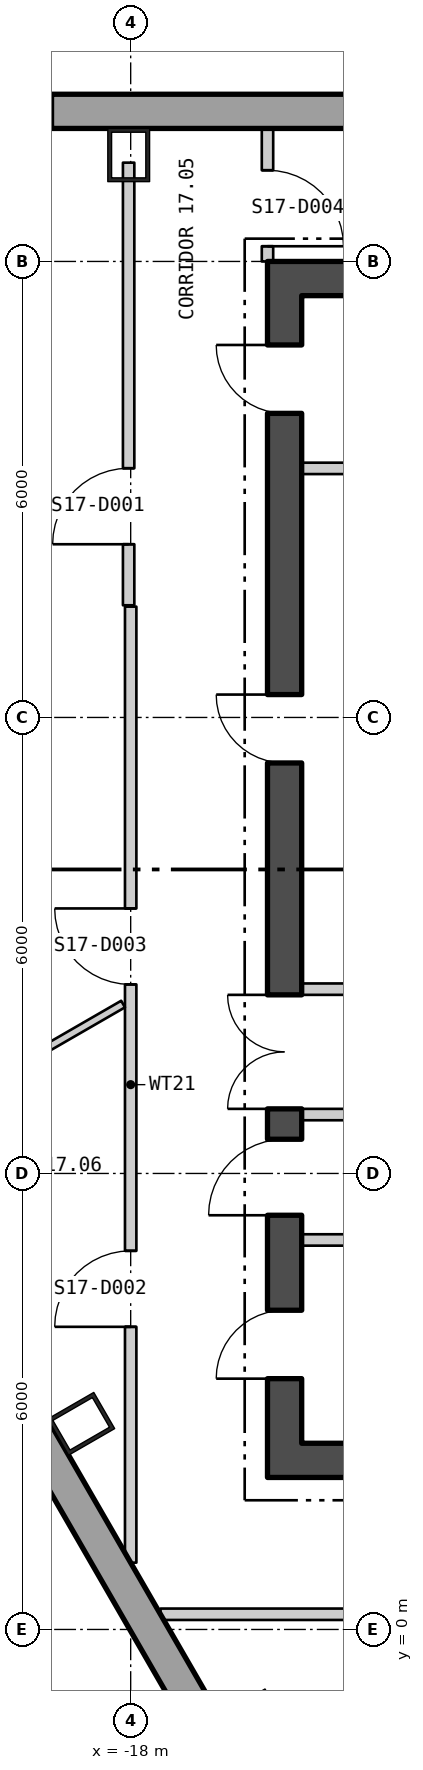
"""IFC4 building model, lengths in metres.
Left out: names, types, materials, properties, quantities, classifications, styles, units other than length and angle.
Written with IfcOpenShell. Run it as: python <this file> out.ifc"""

import sys

from ifc_helpers import new_model, si_unit, direction, frame, frame_2d, origin, origin_2d, place, context, subcontext, project, spatial, polyline, rectangle, hollow_rectangle, outline, extrude, element, fill, save


model = new_model("IFC4")
c1 = context("Model", 3, precision=1e-05, world=origin(), true_north=direction((0.0, 1.0)))
c2 = subcontext(c1, "Body", "Model", "MODEL_VIEW")
j1 = project(units=[si_unit("LENGTHUNIT", "METRE"), si_unit("PLANEANGLEUNIT", "RADIAN")], contexts=[c1])
p1 = place(None, origin())
s1 = spatial("IfcSite", under=j1, at=p1, CompositionType="ELEMENT")
p2 = place(p1, origin())
s2 = spatial("IfcBuilding", under=s1, at=p2, CompositionType="ELEMENT")
p3 = place(p2, frame((0.0, 0.0, 227.7)))
s3 = spatial("IfcBuildingStorey", under=s2, at=p3, CompositionType="ELEMENT", Elevation=227.7)
for number, where, z_axis, x_axis in (
    (1, (-18.026, 19.4, 0.0), (0.0, 0.0, 1.0), (-1.0, 0.0, 0.0)),
    (2, (-18.651, 2.706, 0.0), (0.0, 0.0, 1.0), (0.5, -0.866, 0.0)),
    (3, (-16.398, -1.196, 0.0), (0.0, 0.0, 1.0), (0.5, -0.866, 0.0)),
):
    element("IfcColumn", number, at=place(p3, frame(where, z_axis=z_axis, x_axis=x_axis)), inside=s3, PredefinedType="COLUMN", context=c2, shape_type="SweptSolid", body=[
        extrude(hollow_rectangle(XDim=0.55, YDim=0.7, WallThickness=0.05, at=origin_2d()), origin(), (0.0, 0.0, 1.0), 3.9),
    ])
p4 = place(p3, frame((22.865, 19.975, -0.4), z_axis=(0.0, 0.0, 1.0), x_axis=(-1.0, 0.0, 0.0)))
e4 = element("IfcWall", 4, at=p4, inside=s3, PredefinedType="SOLIDWALL", context=c2, shape_type="SweptSolid", body=[
    extrude(outline(polyline([(-0.13, -0.225), (45.86, -0.225), (45.6, 0.225), (0.13, 0.225), (-0.13, -0.225)])), origin(), (0.0, 0.0, 1.0), 3.9),
])
p5 = place(p4, frame((1.424, 0.0, 1.3)))
e5 = element("IfcOpeningElement", 5, at=p5, cuts=e4, PredefinedType="OPENING", context=c2, shape_type="SweptSolid", body=[
    extrude(rectangle(XDim=2.4, YDim=2.0, at=frame_2d((1.2, 1.0))), frame((0.0, 0.235, 0.0), z_axis=(0.0, -1.0, 0.0), x_axis=(1.0, 0.0, 0.0)), (0.0, 0.0, 1.0), 0.47),
])
p6 = place(p4, frame((10.399, 0.0, 1.3)))
e6 = element("IfcOpeningElement", 6, at=p6, cuts=e4, PredefinedType="OPENING", context=c2, shape_type="SweptSolid", body=[
    extrude(rectangle(XDim=2.4, YDim=2.0, at=frame_2d((1.2, 1.0))), frame((0.0, 0.235, 0.0), z_axis=(0.0, -1.0, 0.0), x_axis=(1.0, 0.0, 0.0)), (0.0, 0.0, 1.0), 0.47),
])
p7 = place(p4, frame((14.905, 0.0, 1.3)))
e7 = element("IfcOpeningElement", 7, at=p7, cuts=e4, PredefinedType="OPENING", context=c2, shape_type="SweptSolid", body=[
    extrude(rectangle(XDim=2.4, YDim=2.0, at=frame_2d((1.2, 1.0))), frame((0.0, 0.235, 0.0), z_axis=(0.0, -1.0, 0.0), x_axis=(1.0, 0.0, 0.0)), (0.0, 0.0, 1.0), 0.47),
])
p8 = place(p4, frame((19.412, 0.0, 1.3)))
e8 = element("IfcOpeningElement", 8, at=p8, cuts=e4, PredefinedType="OPENING", context=c2, shape_type="SweptSolid", body=[
    extrude(rectangle(XDim=2.4, YDim=2.0, at=frame_2d((1.2, 1.0))), frame((0.0, 0.235, 0.0), z_axis=(0.0, -1.0, 0.0), x_axis=(1.0, 0.0, 0.0)), (0.0, 0.0, 1.0), 0.47),
])
p9 = place(p4, frame((23.918, 0.0, 1.3)))
e9 = element("IfcOpeningElement", 9, at=p9, cuts=e4, PredefinedType="OPENING", context=c2, shape_type="SweptSolid", body=[
    extrude(rectangle(XDim=2.4, YDim=2.0, at=frame_2d((1.2, 1.0))), frame((0.0, 0.235, 0.0), z_axis=(0.0, -1.0, 0.0), x_axis=(1.0, 0.0, 0.0)), (0.0, 0.0, 1.0), 0.47),
])
p10 = place(p4, frame((28.425, 0.0, 1.3)))
e10 = element("IfcOpeningElement", 10, at=p10, cuts=e4, PredefinedType="OPENING", context=c2, shape_type="SweptSolid", body=[
    extrude(rectangle(XDim=2.4, YDim=2.0, at=frame_2d((1.2, 1.0))), frame((0.0, 0.235, 0.0), z_axis=(0.0, -1.0, 0.0), x_axis=(1.0, 0.0, 0.0)), (0.0, 0.0, 1.0), 0.47),
])
p11 = place(p4, frame((32.932, 0.0, 1.3)))
e11 = element("IfcOpeningElement", 11, at=p11, cuts=e4, PredefinedType="OPENING", context=c2, shape_type="SweptSolid", body=[
    extrude(rectangle(XDim=2.4, YDim=2.0, at=frame_2d((1.2, 1.0))), frame((0.0, 0.235, 0.0), z_axis=(0.0, -1.0, 0.0), x_axis=(1.0, 0.0, 0.0)), (0.0, 0.0, 1.0), 0.47),
])
p12 = place(p4, frame((41.907, 0.0, 1.3)))
e12 = element("IfcOpeningElement", 12, at=p12, cuts=e4, PredefinedType="OPENING", context=c2, shape_type="SweptSolid", body=[
    extrude(rectangle(XDim=2.4, YDim=2.0, at=frame_2d((1.2, 1.0))), frame((0.0, 0.235, 0.0), z_axis=(0.0, -1.0, 0.0), x_axis=(1.0, 0.0, 0.0)), (0.0, 0.0, 1.0), 0.47),
])
p13 = place(p3, frame((-26.075, 14.415, -0.18), z_axis=(0.0, 0.0, 1.0), x_axis=(0.499999194392, -0.866025868902, 0.0)))
e13 = element("IfcWall", 13, at=p13, inside=s3, PredefinedType="SOLIDWALL", context=c2, shape_type="SweptSolid", body=[
    extrude(outline(polyline([(-0.13, -0.225), (45.86, -0.225), (45.6, 0.225), (0.13, 0.225), (-0.13, -0.225)])), origin(), (0.0, 0.0, 1.0), 3.68),
])
p14 = place(p13, frame((1.424, 0.0, 1.08)))
e14 = element("IfcOpeningElement", 14, at=p14, cuts=e13, PredefinedType="OPENING", context=c2, shape_type="SweptSolid", body=[
    extrude(rectangle(XDim=2.4, YDim=2.0, at=frame_2d((1.2, 1.0))), frame((0.0, 0.235, 0.0), z_axis=(0.0, -1.0, 0.0), x_axis=(1.0, 0.0, 0.0)), (0.0, 0.0, 1.0), 0.47),
])
p15 = place(p13, frame((5.892, 0.0, 1.08)))
e15 = element("IfcOpeningElement", 15, at=p15, cuts=e13, PredefinedType="OPENING", context=c2, shape_type="SweptSolid", body=[
    extrude(rectangle(XDim=2.4, YDim=2.0, at=frame_2d((1.2, 1.0))), frame((0.0, 0.235, 0.0), z_axis=(0.0, -1.0, 0.0), x_axis=(1.0, 0.0, 0.0)), (0.0, 0.0, 1.0), 0.47),
])
p16 = place(p13, frame((10.399, 0.0, 1.08)))
e16 = element("IfcOpeningElement", 16, at=p16, cuts=e13, PredefinedType="OPENING", context=c2, shape_type="SweptSolid", body=[
    extrude(rectangle(XDim=2.4, YDim=2.0, at=frame_2d((1.2, 1.0))), frame((0.0, 0.235, 0.0), z_axis=(0.0, -1.0, 0.0), x_axis=(1.0, 0.0, 0.0)), (0.0, 0.0, 1.0), 0.47),
])
p17 = place(p13, frame((19.412, 0.0, 1.08)))
e17 = element("IfcOpeningElement", 17, at=p17, cuts=e13, PredefinedType="OPENING", context=c2, shape_type="SweptSolid", body=[
    extrude(rectangle(XDim=2.4, YDim=2.0, at=frame_2d((1.2, 1.0))), frame((0.0, 0.235, 0.0), z_axis=(0.0, -1.0, 0.0), x_axis=(1.0, 0.0, 0.0)), (0.0, 0.0, 1.0), 0.47),
])
p18 = place(p13, frame((23.918, 0.0, 1.08)))
e18 = element("IfcOpeningElement", 18, at=p18, cuts=e13, PredefinedType="OPENING", context=c2, shape_type="SweptSolid", body=[
    extrude(rectangle(XDim=2.4, YDim=2.0, at=frame_2d((1.2, 1.0))), frame((0.0, 0.235, 0.0), z_axis=(0.0, -1.0, 0.0), x_axis=(1.0, 0.0, 0.0)), (0.0, 0.0, 1.0), 0.47),
])
p19 = place(p13, frame((28.425, 0.0, 1.08)))
e19 = element("IfcOpeningElement", 19, at=p19, cuts=e13, PredefinedType="OPENING", context=c2, shape_type="SweptSolid", body=[
    extrude(rectangle(XDim=2.4, YDim=2.0, at=frame_2d((1.2, 1.0))), frame((0.0, 0.235, 0.0), z_axis=(0.0, -1.0, 0.0), x_axis=(1.0, 0.0, 0.0)), (0.0, 0.0, 1.0), 0.47),
])
p20 = place(p13, frame((32.932, 0.0, 1.08)))
e20 = element("IfcOpeningElement", 20, at=p20, cuts=e13, PredefinedType="OPENING", context=c2, shape_type="SweptSolid", body=[
    extrude(rectangle(XDim=2.4, YDim=2.0, at=frame_2d((1.2, 1.0))), frame((0.0, 0.235, 0.0), z_axis=(0.0, -1.0, 0.0), x_axis=(1.0, 0.0, 0.0)), (0.0, 0.0, 1.0), 0.47),
])
p21 = place(p13, frame((41.907, 0.0, 1.08)))
e21 = element("IfcOpeningElement", 21, at=p21, cuts=e13, PredefinedType="OPENING", context=c2, shape_type="SweptSolid", body=[
    extrude(rectangle(XDim=2.4, YDim=2.0, at=frame_2d((1.2, 1.0))), frame((0.0, 0.235, 0.0), z_axis=(0.0, -1.0, 0.0), x_axis=(1.0, 0.0, 0.0)), (0.0, 0.0, 1.0), 0.47),
])
p22 = place(p3, frame((-16.2, 2.225, 0.0), z_axis=(0.0, 0.0, 1.0), x_axis=(1.0, 0.0, 0.0)))
e22 = element("IfcWall", 22, at=p22, inside=s3, PredefinedType="SHEAR", context=c2, shape_type="SweptSolid", body=[
    extrude(rectangle(XDim=32.4, YDim=0.45, at=frame_2d((16.2, 0.0))), origin(), (0.0, 0.0, 1.0), 3.7),
])
p23 = place(p22, frame((10.7, 0.0, 0.0)))
e23 = element("IfcOpeningElement", 23, at=p23, cuts=e22, PredefinedType="OPENING", context=c2, shape_type="SweptSolid", body=[
    extrude(rectangle(XDim=1.8, YDim=2.4, at=frame_2d((0.9, 1.2))), frame((0.0, 0.235, 0.0), z_axis=(0.0, -1.0, 0.0), x_axis=(1.0, 0.0, 0.0)), (0.0, 0.0, 1.0), 0.47),
])
p24 = place(p22, frame((20.7, 0.0, 0.0)))
e24 = element("IfcOpeningElement", 24, at=p24, cuts=e22, PredefinedType="OPENING", context=c2, shape_type="SweptSolid", body=[
    extrude(rectangle(XDim=1.8, YDim=2.4, at=frame_2d((0.9, 1.2))), frame((0.0, 0.235, 0.0), z_axis=(0.0, -1.0, 0.0), x_axis=(1.0, 0.0, 0.0)), (0.0, 0.0, 1.0), 0.47),
])
p25 = place(p3, frame((-16.2, 17.775, 0.0), z_axis=(0.0, 0.0, 1.0), x_axis=(1.0, 0.0, 0.0)))
e25 = element("IfcWall", 25, at=p25, inside=s3, PredefinedType="SHEAR", context=c2, shape_type="SweptSolid", body=[
    extrude(rectangle(XDim=32.4, YDim=0.45, at=frame_2d((16.2, 0.0))), origin(), (0.0, 0.0, 1.0), 3.7),
])
p26 = place(p3, frame((-15.975, 2.45, 0.0), z_axis=(0.0, 0.0, 1.0), x_axis=(0.0, 1.0, 0.0)))
e26 = element("IfcWall", 26, at=p26, inside=s3, PredefinedType="SHEAR", context=c2, shape_type="SweptSolid", body=[
    extrude(rectangle(XDim=15.1, YDim=0.45, at=frame_2d((7.55, 0.0))), origin(), (0.0, 0.0, 1.0), 3.7),
])
p27 = place(p26, frame((4.4, 0.0, 0.0)))
e27 = element("IfcOpeningElement", 27, at=p27, cuts=e26, PredefinedType="OPENING", context=c2, shape_type="SweptSolid", body=[
    extrude(rectangle(XDim=1.5, YDim=2.1, at=frame_2d((0.75, 1.05))), frame((0.0, 0.235, 0.0), z_axis=(0.0, -1.0, 0.0), x_axis=(1.0, 0.0, 0.0)), (0.0, 0.0, 1.0), 0.47),
])
p28 = place(p26, frame((0.85, 0.0, 0.0)))
e28 = element("IfcOpeningElement", 28, at=p28, cuts=e26, PredefinedType="OPENING", context=c2, shape_type="SweptSolid", body=[
    extrude(rectangle(XDim=0.9, YDim=2.1, at=frame_2d((0.45, 1.05))), frame((0.0, 0.235, 0.0), z_axis=(0.0, -1.0, 0.0), x_axis=(1.0, 0.0, 0.0)), (0.0, 0.0, 1.0), 0.47),
])
p29 = place(p26, frame((3.0, 0.0, 0.0)))
e29 = element("IfcOpeningElement", 29, at=p29, cuts=e26, PredefinedType="OPENING", context=c2, shape_type="SweptSolid", body=[
    extrude(rectangle(XDim=1.0, YDim=2.1, at=frame_2d((0.5, 1.05))), frame((0.0, 0.235, 0.0), z_axis=(0.0, -1.0, 0.0), x_axis=(1.0, 0.0, 0.0)), (0.0, 0.0, 1.0), 0.47),
])
p30 = place(p26, frame((8.951, 0.0, 0.0)))
e30 = element("IfcOpeningElement", 30, at=p30, cuts=e26, PredefinedType="OPENING", context=c2, shape_type="SweptSolid", body=[
    extrude(rectangle(XDim=0.9, YDim=2.1, at=frame_2d((0.45, 1.05))), frame((0.0, 0.235, 0.0), z_axis=(0.0, -1.0, 0.0), x_axis=(1.0, 0.0, 0.0)), (0.0, 0.0, 1.0), 0.47),
])
p31 = place(p26, frame((13.551, 0.0, 0.0)))
e31 = element("IfcOpeningElement", 31, at=p31, cuts=e26, PredefinedType="OPENING", context=c2, shape_type="SweptSolid", body=[
    extrude(rectangle(XDim=0.9, YDim=2.1, at=frame_2d((0.45, 1.05))), frame((0.0, 0.235, 0.0), z_axis=(0.0, -1.0, 0.0), x_axis=(1.0, 0.0, 0.0)), (0.0, 0.0, 1.0), 0.47),
])
for number, where, z_axis, x_axis in (
    (32, (-15.75, 6.775, 0.0), (0.0, 0.0, 1.0), (1.0, 0.0, 0.0)),
    (33, (-15.75, 8.425, 0.0), (0.0, 0.0, 1.0), (1.0, 0.0, 0.0)),
    (34, (-15.75, 5.125, 0.0), (0.0, 0.0, 1.0), (1.0, 0.0, 0.0)),
    (35, (-15.75, 15.277, 0.0), (0.0, 0.0, 1.0), (1.0, 0.0, 0.0)),
):
    element("IfcWall", number, at=place(p3, frame(where, z_axis=z_axis, x_axis=x_axis)), inside=s3, PredefinedType="PARTITIONING", context=c2, shape_type="SweptSolid", body=[
        extrude(rectangle(XDim=1.25, YDim=0.15, at=frame_2d((0.625, 0.0))), origin(), (0.0, 0.0, 1.0), 3.7),
    ])
p32 = place(p3, frame((-20.818, 6.66, 0.0), z_axis=(0.0, 0.0, 1.0), x_axis=(0.866058244174, 0.499943114462, 0.0)))
e36 = element("IfcWall", 36, at=p32, inside=s3, PredefinedType="PARTITIONING", context=c2, shape_type="SweptSolid", body=[
    extrude(rectangle(XDim=3.138, YDim=0.1, at=frame_2d((1.569, 0.0))), origin(), (0.0, 0.0, 1.0), 3.7),
])
p33 = place(p3, frame((-18.027, 13.476, 0.0), z_axis=(0.0, 0.0, 1.0), x_axis=(0.0, 1.0, 0.0)))
e37 = element("IfcWall", 37, at=p33, inside=s3, PredefinedType="PARTITIONING", context=c2, shape_type="SweptSolid", body=[
    extrude(rectangle(XDim=5.824, YDim=0.15, at=frame_2d((2.912, 0.0))), origin(), (0.0, 0.0, 1.0), 3.7),
])
p34 = place(p33, frame((0.803, 0.0, 0.0)))
e38 = element("IfcOpeningElement", 38, at=p34, cuts=e37, PredefinedType="OPENING", context=c2, shape_type="SweptSolid", body=[
    extrude(rectangle(XDim=1.0, YDim=2.1, at=frame_2d((0.5, 1.05))), frame((0.0, 0.085, 0.0), z_axis=(0.0, -1.0, 0.0), x_axis=(1.0, 0.0, 0.0)), (0.0, 0.0, 1.0), 0.17),
])
p35 = place(p3, frame((-18.0, 0.879, 0.0), z_axis=(0.0, 0.0, 1.0), x_axis=(0.0, 1.0, 0.0)))
e39 = element("IfcWall", 39, at=p35, inside=s3, PredefinedType="PARTITIONING", context=c2, shape_type="SweptSolid", body=[
    extrude(rectangle(XDim=12.579, YDim=0.15, at=frame_2d((6.29, 0.0))), origin(), (0.0, 0.0, 1.0), 3.7),
])
p36 = place(p35, frame((3.103, 0.0, 0.0)))
e40 = element("IfcOpeningElement", 40, at=p36, cuts=e39, PredefinedType="OPENING", context=c2, shape_type="SweptSolid", body=[
    extrude(rectangle(XDim=1.0, YDim=2.1, at=frame_2d((0.5, 1.05))), frame((0.0, 0.085, 0.0), z_axis=(0.0, -1.0, 0.0), x_axis=(1.0, 0.0, 0.0)), (0.0, 0.0, 1.0), 0.17),
])
p37 = place(p35, frame((7.608, 0.0, 0.0)))
e41 = element("IfcOpeningElement", 41, at=p37, cuts=e39, PredefinedType="OPENING", context=c2, shape_type="SweptSolid", body=[
    extrude(rectangle(XDim=1.0, YDim=2.1, at=frame_2d((0.5, 1.05))), frame((0.0, 0.085, 0.0), z_axis=(0.0, -1.0, 0.0), x_axis=(1.0, 0.0, 0.0)), (0.0, 0.0, 1.0), 0.17),
])
p38 = place(p3, frame((-17.608, 0.2, 0.0), z_axis=(0.0, 0.0, 1.0), x_axis=(1.0, 0.0, 0.0)))
e42 = element("IfcWall", 42, at=p38, inside=s3, PredefinedType="PARTITIONING", context=c2, shape_type="SweptSolid", body=[
    extrude(rectangle(XDim=10.863, YDim=0.15, at=frame_2d((5.431, 0.0))), origin(), (0.0, 0.0, 1.0), 3.7),
])
p39 = place(p3, frame((-16.2, 18.0, 0.0), z_axis=(0.0, 0.0, 1.0), x_axis=(0.0, 1.0, 0.0)))
e43 = element("IfcWall", 43, at=p39, inside=s3, PredefinedType="PARTITIONING", context=c2, shape_type="SweptSolid", body=[
    extrude(rectangle(XDim=1.75, YDim=0.15, at=frame_2d((0.875, 0.0))), origin(), (0.0, 0.0, 1.0), 3.7),
])
p40 = place(p39, frame((0.2, 0.0, 0.0)))
e44 = element("IfcOpeningElement", 44, at=p40, cuts=e43, PredefinedType="OPENING", context=c2, shape_type="SweptSolid", body=[
    extrude(rectangle(XDim=1.0, YDim=2.1, at=frame_2d((0.5, 1.05))), frame((0.0, 0.085, 0.0), z_axis=(0.0, -1.0, 0.0), x_axis=(1.0, 0.0, 0.0)), (0.0, 0.0, 1.0), 0.17),
])
p41 = place(p27, origin())
e45 = element("IfcDoor", 45, at=p41, inside=s3, OperationType="DOUBLE_DOOR_SINGLE_SWING", PredefinedType="DOOR", context=c2, shape_type="SweptSolid", body=[
    extrude(rectangle(XDim=1.5, YDim=2.1, at=frame_2d((0.75, 1.05))), frame((0.0, 0.025, 0.0), z_axis=(0.0, -1.0, 0.0), x_axis=(1.0, 0.0, 0.0)), (0.0, 0.0, 1.0), 0.05),
])
fill(e27, e45)
p42 = place(p28, origin())
e46 = element("IfcDoor", 46, at=p42, inside=s3, OperationType="SINGLE_SWING_RIGHT", PredefinedType="DOOR", context=c2, shape_type="SweptSolid", body=[
    extrude(rectangle(XDim=0.9, YDim=2.1, at=frame_2d((0.45, 1.05))), frame((0.0, 0.025, 0.0), z_axis=(0.0, -1.0, 0.0), x_axis=(1.0, 0.0, 0.0)), (0.0, 0.0, 1.0), 0.05),
])
fill(e28, e46)
p43 = place(p29, origin())
e47 = element("IfcDoor", 47, at=p43, inside=s3, OperationType="SINGLE_SWING_RIGHT", PredefinedType="DOOR", context=c2, shape_type="SweptSolid", body=[
    extrude(rectangle(XDim=1.0, YDim=2.1, at=frame_2d((0.5, 1.05))), frame((0.0, 0.025, 0.0), z_axis=(0.0, -1.0, 0.0), x_axis=(1.0, 0.0, 0.0)), (0.0, 0.0, 1.0), 0.05),
])
fill(e29, e47)
p44 = place(p30, origin())
e48 = element("IfcDoor", 48, at=p44, inside=s3, OperationType="SINGLE_SWING_LEFT", PredefinedType="DOOR", context=c2, shape_type="SweptSolid", body=[
    extrude(rectangle(XDim=0.9, YDim=2.1, at=frame_2d((0.45, 1.05))), frame((0.0, 0.025, 0.0), z_axis=(0.0, -1.0, 0.0), x_axis=(1.0, 0.0, 0.0)), (0.0, 0.0, 1.0), 0.05),
])
fill(e30, e48)
p45 = place(p31, origin())
e49 = element("IfcDoor", 49, at=p45, inside=s3, OperationType="SINGLE_SWING_LEFT", PredefinedType="DOOR", context=c2, shape_type="SweptSolid", body=[
    extrude(rectangle(XDim=0.9, YDim=2.1, at=frame_2d((0.45, 1.05))), frame((0.0, 0.025, 0.0), z_axis=(0.0, -1.0, 0.0), x_axis=(1.0, 0.0, 0.0)), (0.0, 0.0, 1.0), 0.05),
])
fill(e31, e49)
p46 = place(p34, origin())
e50 = element("IfcDoor", 50, at=p46, inside=s3, OperationType="SINGLE_SWING_RIGHT", PredefinedType="DOOR", context=c2, shape_type="SweptSolid", body=[
    extrude(rectangle(XDim=1.0, YDim=2.1, at=frame_2d((0.5, 1.05))), frame((0.0, 0.025, 0.0), z_axis=(0.0, -1.0, 0.0), x_axis=(1.0, 0.0, 0.0)), (0.0, 0.0, 1.0), 0.05),
])
fill(e38, e50)
p47 = place(p36, origin())
e51 = element("IfcDoor", 51, at=p47, inside=s3, OperationType="SINGLE_SWING_RIGHT", PredefinedType="DOOR", context=c2, shape_type="SweptSolid", body=[
    extrude(rectangle(XDim=1.0, YDim=2.1, at=frame_2d((0.5, 1.05))), frame((0.0, 0.025, 0.0), z_axis=(0.0, -1.0, 0.0), x_axis=(1.0, 0.0, 0.0)), (0.0, 0.0, 1.0), 0.05),
])
fill(e40, e51)
p48 = place(p37, origin())
e52 = element("IfcDoor", 52, at=p48, inside=s3, OperationType="SINGLE_SWING_LEFT", PredefinedType="DOOR", context=c2, shape_type="SweptSolid", body=[
    extrude(rectangle(XDim=1.0, YDim=2.1, at=frame_2d((0.5, 1.05))), frame((0.0, 0.025, 0.0), z_axis=(0.0, -1.0, 0.0), x_axis=(1.0, 0.0, 0.0)), (0.0, 0.0, 1.0), 0.05),
])
fill(e41, e52)
p49 = place(p40, origin())
e53 = element("IfcDoor", 53, at=p49, inside=s3, OperationType="SINGLE_SWING_LEFT", PredefinedType="DOOR", context=c2, shape_type="SweptSolid", body=[
    extrude(rectangle(XDim=1.0, YDim=2.1, at=frame_2d((0.5, 1.05))), frame((0.0, 0.025, 0.0), z_axis=(0.0, -1.0, 0.0), x_axis=(1.0, 0.0, 0.0)), (0.0, 0.0, 1.0), 0.05),
])
fill(e44, e53)
save(model, sys.argv[1])
